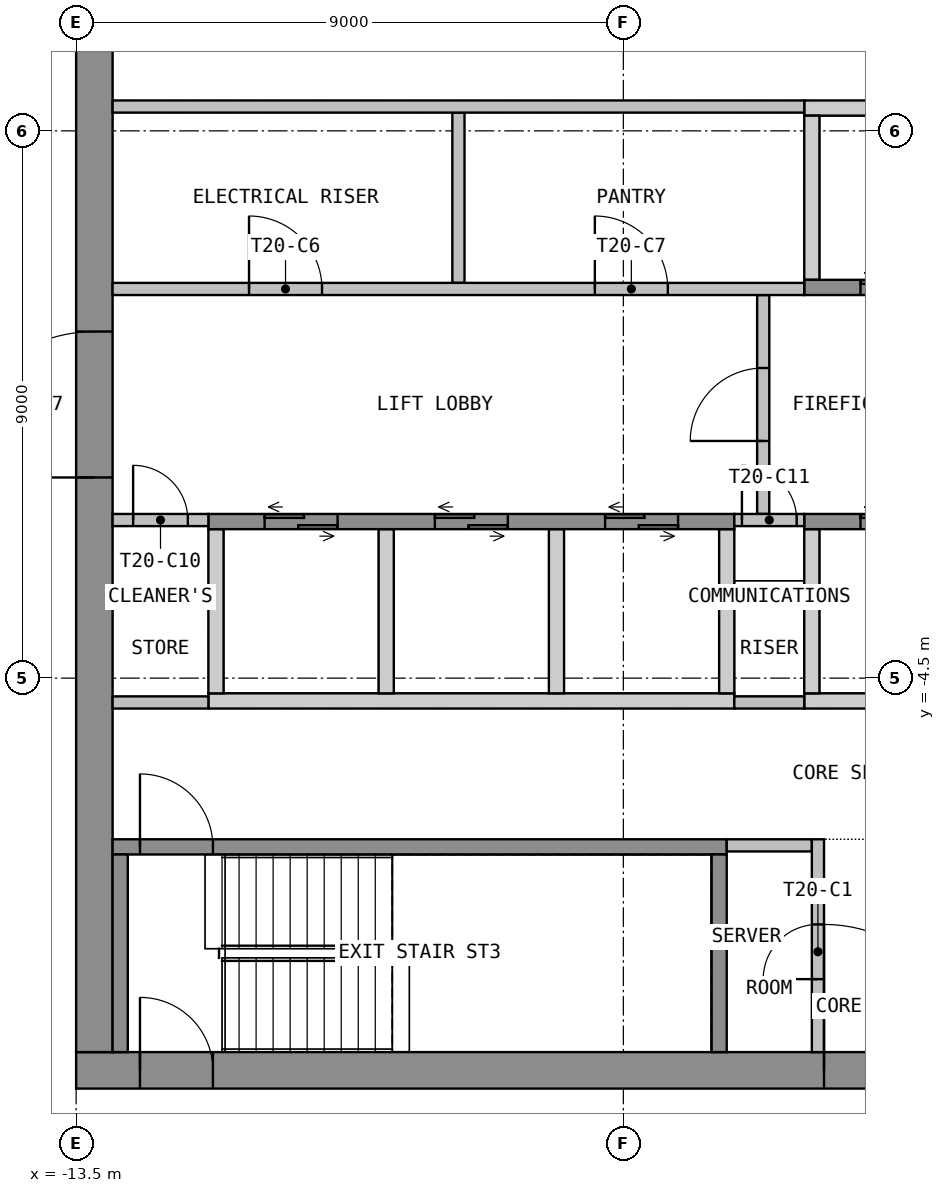
"""IFC4 building model, lengths in metres.
Left out: names, types, materials, properties, quantities, classifications, styles, units other than length and angle.
Written with IfcOpenShell. Run it as: python <this file> out.ifc"""

import sys

from ifc_helpers import new_model, si_unit, direction, frame, frame_2d, origin, place, context, subcontext, project, spatial, polyline, rectangle, outline, extrude, element, fill, save


model = new_model("IFC4")
c1 = context("Model", 3, precision=1e-05, world=origin(), true_north=direction((0.0, 1.0)))
c2 = subcontext(c1, "Body", "Model", "MODEL_VIEW")
j1 = project(units=[si_unit("LENGTHUNIT", "METRE"), si_unit("PLANEANGLEUNIT", "RADIAN")], contexts=[c1])
p1 = place(None, origin())
s1 = spatial("IfcSite", under=j1, at=p1, CompositionType="ELEMENT")
p2 = place(p1, origin())
s2 = spatial("IfcBuilding", under=s1, at=p2, CompositionType="ELEMENT")
p3 = place(p2, frame((0.0, 0.0, 270.3)))
s3 = spatial("IfcBuildingStorey", under=s2, at=p3, CompositionType="ELEMENT", Elevation=270.3)
p4 = place(p3, frame((-13.5, -10.95, 0.0), z_axis=(0.0, 0.0, 1.0), x_axis=(1.0, 0.0, 0.0)))
e1 = element("IfcWall", 1, at=p4, inside=s3, PredefinedType="SHEAR", context=c2, shape_type="SweptSolid", body=[
    extrude(rectangle(XDim=27.0, YDim=0.6, at=frame_2d((13.5, 0.0))), origin(), (0.0, 0.0, 1.0), 3.575),
])
p5 = place(p4, frame((12.3, 0.0, 0.0)))
e2 = element("IfcOpeningElement", 2, at=p5, cuts=e1, PredefinedType="OPENING", context=c2, shape_type="SweptSolid", body=[
    extrude(rectangle(XDim=2.4, YDim=2.1, at=frame_2d((1.2, 1.05))), frame((0.0, 0.31, 0.0), z_axis=(0.0, -1.0, 0.0), x_axis=(1.0, 0.0, 0.0)), (0.0, 0.0, 1.0), 0.62),
])
p6 = place(p4, frame((1.05, 0.0, 0.0)))
e3 = element("IfcOpeningElement", 3, at=p6, cuts=e1, PredefinedType="OPENING", context=c2, shape_type="SweptSolid", body=[
    extrude(rectangle(XDim=1.2, YDim=2.1, at=frame_2d((0.6, 1.05))), frame((0.0, 0.31, 0.0), z_axis=(0.0, -1.0, 0.0), x_axis=(1.0, 0.0, 0.0)), (0.0, 0.0, 1.0), 0.62),
])
p7 = place(p4, frame((24.75, 0.0, 0.0)))
e4 = element("IfcOpeningElement", 4, at=p7, cuts=e1, PredefinedType="OPENING", context=c2, shape_type="SweptSolid", body=[
    extrude(rectangle(XDim=1.2, YDim=2.1, at=frame_2d((0.6, 1.05))), frame((0.0, 0.31, 0.0), z_axis=(0.0, -1.0, 0.0), x_axis=(1.0, 0.0, 0.0)), (0.0, 0.0, 1.0), 0.62),
])
p8 = place(p3, frame((-13.2, -10.65, 0.0), z_axis=(0.0, 0.0, 1.0), x_axis=(0.0, 1.0, 0.0)))
e5 = element("IfcWall", 5, at=p8, inside=s3, PredefinedType="SHEAR", context=c2, shape_type="SweptSolid", body=[
    extrude(rectangle(XDim=21.3, YDim=0.6, at=frame_2d((10.65, 0.0))), origin(), (0.0, 0.0, 1.0), 3.575),
])
p9 = place(p8, frame((9.45, 0.0, 0.0)))
e6 = element("IfcOpeningElement", 6, at=p9, cuts=e5, PredefinedType="OPENING", context=c2, shape_type="SweptSolid", body=[
    extrude(rectangle(XDim=2.4, YDim=2.1, at=frame_2d((1.2, 1.05))), frame((0.0, 0.31, 0.0), z_axis=(0.0, -1.0, 0.0), x_axis=(1.0, 0.0, 0.0)), (0.0, 0.0, 1.0), 0.62),
])
p10 = place(p3, origin())
e7 = element("IfcWall", 7, at=p10, inside=s3, PredefinedType="SHEAR", context=c2, shape_type="SweptSolid", body=[
    extrude(outline(polyline([(-1.525, 4.75), (1.525, 4.75), (1.525, 5.0), (-1.525, 5.0), (-1.525, 4.75)])), origin(), (0.0, 0.0, 1.0), 3.575),
])
p11 = place(p3, origin())
e8 = element("IfcWall", 8, at=p11, inside=s3, PredefinedType="SHEAR", context=c2, shape_type="SweptSolid", body=[
    extrude(outline(polyline([(-1.525, 2.05), (-1.275, 2.05), (-1.275, 4.75), (-1.525, 4.75), (-1.525, 2.05)])), origin(), (0.0, 0.0, 1.0), 3.575),
])
p12 = place(p3, frame((-1.525, 1.925, 0.0), z_axis=(0.0, 0.0, 1.0), x_axis=(1.0, 0.0, 0.0)))
e9 = element("IfcWall", 9, at=p12, inside=s3, PredefinedType="SHEAR", context=c2, shape_type="SweptSolid", body=[
    extrude(rectangle(XDim=3.05, YDim=0.25, at=frame_2d((1.525, 0.0))), origin(), (0.0, 0.0, 1.0), 3.575),
])
p13 = place(p12, frame((0.925, 0.0, 0.0)))
e10 = element("IfcOpeningElement", 10, at=p13, cuts=e9, PredefinedType="OPENING", context=c2, shape_type="SweptSolid", body=[
    extrude(rectangle(XDim=1.2, YDim=2.1, at=frame_2d((0.6, 1.05))), frame((0.0, 0.135, 0.0), z_axis=(0.0, -1.0, 0.0), x_axis=(1.0, 0.0, 0.0)), (0.0, 0.0, 1.0), 0.27),
])
p14 = place(p3, origin())
e11 = element("IfcWall", 11, at=p14, inside=s3, PredefinedType="SHEAR", context=c2, shape_type="SweptSolid", body=[
    extrude(outline(polyline([(-11.325, -5.0), (-2.675, -5.0), (-2.675, -4.75), (-11.325, -4.75), (-11.325, -5.0)])), origin(), (0.0, 0.0, 1.0), 3.575),
])
p15 = place(p3, origin())
e12 = element("IfcWall", 12, at=p15, inside=s3, PredefinedType="SHEAR", context=c2, shape_type="SweptSolid", body=[
    extrude(outline(polyline([(-1.525, -5.0), (4.325, -5.0), (4.325, -4.75), (-1.525, -4.75), (-1.525, -5.0)])), origin(), (0.0, 0.0, 1.0), 3.575),
])
p16 = place(p3, origin())
e13 = element("IfcWall", 13, at=p16, inside=s3, PredefinedType="SHEAR", context=c2, shape_type="SweptSolid", body=[
    extrude(outline(polyline([(-11.325, -4.75), (-11.075, -4.75), (-11.075, -2.05), (-11.325, -2.05), (-11.325, -4.75)])), origin(), (0.0, 0.0, 1.0), 3.575),
])
p17 = place(p3, origin())
e14 = element("IfcWall", 14, at=p17, inside=s3, PredefinedType="SHEAR", context=c2, shape_type="SweptSolid", body=[
    extrude(outline(polyline([(-8.525, -4.75), (-8.275, -4.75), (-8.275, -2.05), (-8.525, -2.05), (-8.525, -4.75)])), origin(), (0.0, 0.0, 1.0), 3.575),
])
p18 = place(p3, origin())
e15 = element("IfcWall", 15, at=p18, inside=s3, PredefinedType="SHEAR", context=c2, shape_type="SweptSolid", body=[
    extrude(outline(polyline([(-5.725, -4.75), (-5.475, -4.75), (-5.475, -2.05), (-5.725, -2.05), (-5.725, -4.75)])), origin(), (0.0, 0.0, 1.0), 3.575),
])
p19 = place(p3, origin())
e16 = element("IfcWall", 16, at=p19, inside=s3, PredefinedType="SHEAR", context=c2, shape_type="SweptSolid", body=[
    extrude(outline(polyline([(-2.925, -4.75), (-2.675, -4.75), (-2.675, -2.05), (-2.925, -2.05), (-2.925, -4.75)])), origin(), (0.0, 0.0, 1.0), 3.575),
])
p20 = place(p3, origin())
e17 = element("IfcWall", 17, at=p20, inside=s3, PredefinedType="SHEAR", context=c2, shape_type="SweptSolid", body=[
    extrude(outline(polyline([(-1.525, -4.75), (-1.275, -4.75), (-1.275, -2.05), (-1.525, -2.05), (-1.525, -4.75)])), origin(), (0.0, 0.0, 1.0), 3.575),
])
p21 = place(p3, frame((-11.325, -1.925, 0.0), z_axis=(0.0, 0.0, 1.0), x_axis=(1.0, 0.0, 0.0)))
e18 = element("IfcWall", 18, at=p21, inside=s3, PredefinedType="SHEAR", context=c2, shape_type="SweptSolid", body=[
    extrude(rectangle(XDim=8.65, YDim=0.25, at=frame_2d((4.325, 0.0))), origin(), (0.0, 0.0, 1.0), 3.575),
])
p22 = place(p21, frame((0.925, 0.0, 0.0)))
e19 = element("IfcOpeningElement", 19, at=p22, cuts=e18, PredefinedType="OPENING", context=c2, shape_type="SweptSolid", body=[
    extrude(rectangle(XDim=1.2, YDim=2.1, at=frame_2d((0.6, 1.05))), frame((0.0, 0.135, 0.0), z_axis=(0.0, -1.0, 0.0), x_axis=(1.0, 0.0, 0.0)), (0.0, 0.0, 1.0), 0.27),
])
p23 = place(p21, frame((3.725, 0.0, 0.0)))
e20 = element("IfcOpeningElement", 20, at=p23, cuts=e18, PredefinedType="OPENING", context=c2, shape_type="SweptSolid", body=[
    extrude(rectangle(XDim=1.2, YDim=2.1, at=frame_2d((0.6, 1.05))), frame((0.0, 0.135, 0.0), z_axis=(0.0, -1.0, 0.0), x_axis=(1.0, 0.0, 0.0)), (0.0, 0.0, 1.0), 0.27),
])
p24 = place(p21, frame((6.525, 0.0, 0.0)))
e21 = element("IfcOpeningElement", 21, at=p24, cuts=e18, PredefinedType="OPENING", context=c2, shape_type="SweptSolid", body=[
    extrude(rectangle(XDim=1.2, YDim=2.1, at=frame_2d((0.6, 1.05))), frame((0.0, 0.135, 0.0), z_axis=(0.0, -1.0, 0.0), x_axis=(1.0, 0.0, 0.0)), (0.0, 0.0, 1.0), 0.27),
])
p25 = place(p3, frame((-1.525, -1.925, 0.0), z_axis=(0.0, 0.0, 1.0), x_axis=(1.0, 0.0, 0.0)))
e22 = element("IfcWall", 22, at=p25, inside=s3, PredefinedType="SHEAR", context=c2, shape_type="SweptSolid", body=[
    extrude(rectangle(XDim=5.85, YDim=0.25, at=frame_2d((2.925, 0.0))), origin(), (0.0, 0.0, 1.0), 3.575),
])
p26 = place(p25, frame((0.925, 0.0, 0.0)))
e23 = element("IfcOpeningElement", 23, at=p26, cuts=e22, PredefinedType="OPENING", context=c2, shape_type="SweptSolid", body=[
    extrude(rectangle(XDim=1.2, YDim=2.1, at=frame_2d((0.6, 1.05))), frame((0.0, 0.135, 0.0), z_axis=(0.0, -1.0, 0.0), x_axis=(1.0, 0.0, 0.0)), (0.0, 0.0, 1.0), 0.27),
])
p27 = place(p25, frame((3.725, 0.0, 0.0)))
e24 = element("IfcOpeningElement", 24, at=p27, cuts=e22, PredefinedType="OPENING", context=c2, shape_type="SweptSolid", body=[
    extrude(rectangle(XDim=1.2, YDim=2.1, at=frame_2d((0.6, 1.05))), frame((0.0, 0.135, 0.0), z_axis=(0.0, -1.0, 0.0), x_axis=(1.0, 0.0, 0.0)), (0.0, 0.0, 1.0), 0.27),
])
p28 = place(p3, frame((-2.2, -1.8, 0.0), z_axis=(0.0, 0.0, 1.0), x_axis=(0.0, 1.0, 0.0)))
e25 = element("IfcWall", 25, at=p28, inside=s3, PredefinedType="PARTITIONING", context=c2, shape_type="SweptSolid", body=[
    extrude(rectangle(XDim=3.6, YDim=0.2, at=frame_2d((1.8, 0.0))), origin(), (0.0, 0.0, 1.0), 3.575),
])
p29 = place(p28, frame((1.2, 0.0, 0.0)))
e26 = element("IfcOpeningElement", 26, at=p29, cuts=e25, PredefinedType="OPENING", context=c2, shape_type="SweptSolid", body=[
    extrude(rectangle(XDim=1.2, YDim=2.1, at=frame_2d((0.6, 1.05))), frame((0.0, 0.11, 0.0), z_axis=(0.0, -1.0, 0.0), x_axis=(1.0, 0.0, 0.0)), (0.0, 0.0, 1.0), 0.22),
])
p30 = place(p3, frame((-12.9, -7.275, 0.0), z_axis=(0.0, 0.0, 1.0), x_axis=(1.0, 0.0, 0.0)))
e27 = element("IfcWall", 27, at=p30, inside=s3, PredefinedType="SHEAR", context=c2, shape_type="SweptSolid", body=[
    extrude(rectangle(XDim=10.1, YDim=0.25, at=frame_2d((5.05, 0.0))), origin(), (0.0, 0.0, 1.0), 3.575),
])
p31 = place(p30, frame((0.45, 0.0, 0.0)))
e28 = element("IfcOpeningElement", 28, at=p31, cuts=e27, PredefinedType="OPENING", context=c2, shape_type="SweptSolid", body=[
    extrude(rectangle(XDim=1.2, YDim=2.1, at=frame_2d((0.6, 1.05))), frame((0.0, 0.135, 0.0), z_axis=(0.0, -1.0, 0.0), x_axis=(1.0, 0.0, 0.0)), (0.0, 0.0, 1.0), 0.27),
])
for number, where, z_axis, x_axis in (
    (29, (-12.775, -10.65, 0.0), (0.0, 0.0, 1.0), (0.0, 1.0, 0.0)),
    (30, (-2.925, -10.65, 0.0), (0.0, 0.0, 1.0), (0.0, 1.0, 0.0)),
):
    element("IfcWall", number, at=place(p3, frame(where, z_axis=z_axis, x_axis=x_axis)), inside=s3, PredefinedType="SHEAR", context=c2, shape_type="SweptSolid", body=[
        extrude(rectangle(XDim=3.25, YDim=0.25, at=frame_2d((1.625, 0.0))), origin(), (0.0, 0.0, 1.0), 3.575),
    ])
p32 = place(p3, frame((-2.8, -7.25, 0.0), z_axis=(0.0, 0.0, 1.0), x_axis=(1.0, 0.0, 0.0)))
e31 = element("IfcWall", 31, at=p32, inside=s3, PredefinedType="PARTITIONING", context=c2, shape_type="SweptSolid", body=[
    extrude(rectangle(XDim=1.4, YDim=0.2, at=frame_2d((0.7, 0.0))), origin(), (0.0, 0.0, 1.0), 3.575),
])
p33 = place(p3, frame((-1.3, -10.65, 0.0), z_axis=(0.0, 0.0, 1.0), x_axis=(0.0, 1.0, 0.0)))
e32 = element("IfcWall", 32, at=p33, inside=s3, PredefinedType="PARTITIONING", context=c2, shape_type="SweptSolid", body=[
    extrude(rectangle(XDim=3.5, YDim=0.2, at=frame_2d((1.75, 0.0))), origin(), (0.0, 0.0, 1.0), 3.575),
])
p34 = place(p33, frame((1.2, 0.0, 0.0)))
e33 = element("IfcOpeningElement", 33, at=p34, cuts=e32, PredefinedType="OPENING", context=c2, shape_type="SweptSolid", body=[
    extrude(rectangle(XDim=0.9, YDim=2.1, at=frame_2d((0.45, 1.05))), frame((0.0, 0.11, 0.0), z_axis=(0.0, -1.0, 0.0), x_axis=(1.0, 0.0, 0.0)), (0.0, 0.0, 1.0), 0.22),
])
p35 = place(p3, frame((-7.212, 2.0, 0.0), z_axis=(0.0, 0.0, 1.0), x_axis=(0.0, 1.0, 0.0)))
e34 = element("IfcWall", 34, at=p35, inside=s3, PredefinedType="PARTITIONING", context=c2, shape_type="SweptSolid", body=[
    extrude(rectangle(XDim=2.8, YDim=0.2, at=frame_2d((1.4, 0.0))), origin(), (0.0, 0.0, 1.0), 3.575),
])
p36 = place(p3, frame((-12.9, 1.9, 0.0), z_axis=(0.0, 0.0, 1.0), x_axis=(1.0, 0.0, 0.0)))
e35 = element("IfcWall", 35, at=p36, inside=s3, PredefinedType="PARTITIONING", context=c2, shape_type="SweptSolid", body=[
    extrude(rectangle(XDim=11.375, YDim=0.2, at=frame_2d((5.688, 0.0))), origin(), (0.0, 0.0, 1.0), 3.575),
])
p37 = place(p36, frame((2.244, 0.0, 0.0)))
e36 = element("IfcOpeningElement", 36, at=p37, cuts=e35, PredefinedType="OPENING", context=c2, shape_type="SweptSolid", body=[
    extrude(rectangle(XDim=1.2, YDim=2.1, at=frame_2d((0.6, 1.05))), frame((0.0, 0.11, 0.0), z_axis=(0.0, -1.0, 0.0), x_axis=(1.0, 0.0, 0.0)), (0.0, 0.0, 1.0), 0.22),
])
p38 = place(p36, frame((7.931, 0.0, 0.0)))
e37 = element("IfcOpeningElement", 37, at=p38, cuts=e35, PredefinedType="OPENING", context=c2, shape_type="SweptSolid", body=[
    extrude(rectangle(XDim=1.2, YDim=2.1, at=frame_2d((0.6, 1.05))), frame((0.0, 0.11, 0.0), z_axis=(0.0, -1.0, 0.0), x_axis=(1.0, 0.0, 0.0)), (0.0, 0.0, 1.0), 0.22),
])
p39 = place(p3, frame((-12.9, 4.9, 0.0), z_axis=(0.0, 0.0, 1.0), x_axis=(1.0, 0.0, 0.0)))
e38 = element("IfcWall", 38, at=p39, inside=s3, PredefinedType="PARTITIONING", context=c2, shape_type="SweptSolid", body=[
    extrude(rectangle(XDim=11.375, YDim=0.2, at=frame_2d((5.688, 0.0))), origin(), (0.0, 0.0, 1.0), 3.575),
])
p40 = place(p3, frame((-12.9, -1.9, 0.0), z_axis=(0.0, 0.0, 1.0), x_axis=(1.0, 0.0, 0.0)))
e39 = element("IfcWall", 39, at=p40, inside=s3, PredefinedType="PARTITIONING", context=c2, shape_type="SweptSolid", body=[
    extrude(rectangle(XDim=1.575, YDim=0.2, at=frame_2d((0.788, 0.0))), origin(), (0.0, 0.0, 1.0), 3.575),
])
p41 = place(p40, frame((0.337, 0.0, 0.0)))
e40 = element("IfcOpeningElement", 40, at=p41, cuts=e39, PredefinedType="OPENING", context=c2, shape_type="SweptSolid", body=[
    extrude(rectangle(XDim=0.9, YDim=2.1, at=frame_2d((0.45, 1.05))), frame((0.0, 0.11, 0.0), z_axis=(0.0, -1.0, 0.0), x_axis=(1.0, 0.0, 0.0)), (0.0, 0.0, 1.0), 0.22),
])
p42 = place(p3, frame((-12.9, -4.9, 0.0), z_axis=(0.0, 0.0, 1.0), x_axis=(1.0, 0.0, 0.0)))
e41 = element("IfcWall", 41, at=p42, inside=s3, PredefinedType="PARTITIONING", context=c2, shape_type="SweptSolid", body=[
    extrude(rectangle(XDim=1.575, YDim=0.2, at=frame_2d((0.788, 0.0))), origin(), (0.0, 0.0, 1.0), 3.575),
])
p43 = place(p3, frame((-2.675, -1.9, 0.0), z_axis=(0.0, 0.0, 1.0), x_axis=(1.0, 0.0, 0.0)))
e42 = element("IfcWall", 42, at=p43, inside=s3, PredefinedType="PARTITIONING", context=c2, shape_type="SweptSolid", body=[
    extrude(rectangle(XDim=1.15, YDim=0.2, at=frame_2d((0.575, 0.0))), origin(), (0.0, 0.0, 1.0), 3.575),
])
p44 = place(p43, frame((0.125, 0.0, 0.0)))
e43 = element("IfcOpeningElement", 43, at=p44, cuts=e42, PredefinedType="OPENING", context=c2, shape_type="SweptSolid", body=[
    extrude(rectangle(XDim=0.9, YDim=2.1, at=frame_2d((0.45, 1.05))), frame((0.0, 0.11, 0.0), z_axis=(0.0, -1.0, 0.0), x_axis=(1.0, 0.0, 0.0)), (0.0, 0.0, 1.0), 0.22),
])
p45 = place(p3, frame((-2.675, -4.9, 0.0), z_axis=(0.0, 0.0, 1.0), x_axis=(1.0, 0.0, 0.0)))
e44 = element("IfcWall", 44, at=p45, inside=s3, PredefinedType="PARTITIONING", context=c2, shape_type="SweptSolid", body=[
    extrude(rectangle(XDim=1.15, YDim=0.2, at=frame_2d((0.575, 0.0))), origin(), (0.0, 0.0, 1.0), 3.575),
])
p46 = place(p9, origin())
e45 = element("IfcDoor", 45, at=p46, inside=s3, OperationType="DOUBLE_DOOR_DOUBLE_SWING", PredefinedType="DOOR", context=c2, shape_type="SweptSolid", body=[
    extrude(rectangle(XDim=2.4, YDim=2.1, at=frame_2d((1.2, 1.05))), frame((0.0, 0.025, 0.0), z_axis=(0.0, -1.0, 0.0), x_axis=(1.0, 0.0, 0.0)), (0.0, 0.0, 1.0), 0.05),
])
fill(e6, e45)
p47 = place(p5, origin())
e46 = element("IfcDoor", 46, at=p47, inside=s3, OperationType="DOUBLE_DOOR_DOUBLE_SWING", PredefinedType="DOOR", context=c2, shape_type="SweptSolid", body=[
    extrude(rectangle(XDim=2.4, YDim=2.1, at=frame_2d((1.2, 1.05))), frame((0.0, 0.025, 0.0), z_axis=(0.0, -1.0, 0.0), x_axis=(1.0, 0.0, 0.0)), (0.0, 0.0, 1.0), 0.05),
])
fill(e2, e46)
p48 = place(p6, origin())
e47 = element("IfcDoor", 47, at=p48, inside=s3, OperationType="SINGLE_SWING_RIGHT", PredefinedType="DOOR", context=c2, shape_type="SweptSolid", body=[
    extrude(rectangle(XDim=1.2, YDim=2.1, at=frame_2d((0.6, 1.05))), frame((0.0, 0.025, 0.0), z_axis=(0.0, -1.0, 0.0), x_axis=(1.0, 0.0, 0.0)), (0.0, 0.0, 1.0), 0.05),
])
fill(e3, e47)
p49 = place(p13, origin())
e48 = element("IfcDoor", 48, at=p49, inside=s3, OperationType="DOUBLE_DOOR_SLIDING", PredefinedType="DOOR", context=c2, shape_type="SweptSolid", body=[
    extrude(rectangle(XDim=1.2, YDim=2.1, at=frame_2d((0.6, 1.05))), frame((0.0, 0.025, 0.0), z_axis=(0.0, -1.0, 0.0), x_axis=(1.0, 0.0, 0.0)), (0.0, 0.0, 1.0), 0.05),
])
fill(e10, e48)
p50 = place(p22, origin())
e49 = element("IfcDoor", 49, at=p50, inside=s3, OperationType="DOUBLE_DOOR_SLIDING", PredefinedType="DOOR", context=c2, shape_type="SweptSolid", body=[
    extrude(rectangle(XDim=1.2, YDim=2.1, at=frame_2d((0.6, 1.05))), frame((0.0, 0.025, 0.0), z_axis=(0.0, -1.0, 0.0), x_axis=(1.0, 0.0, 0.0)), (0.0, 0.0, 1.0), 0.05),
])
fill(e19, e49)
p51 = place(p23, origin())
e50 = element("IfcDoor", 50, at=p51, inside=s3, OperationType="DOUBLE_DOOR_SLIDING", PredefinedType="DOOR", context=c2, shape_type="SweptSolid", body=[
    extrude(rectangle(XDim=1.2, YDim=2.1, at=frame_2d((0.6, 1.05))), frame((0.0, 0.025, 0.0), z_axis=(0.0, -1.0, 0.0), x_axis=(1.0, 0.0, 0.0)), (0.0, 0.0, 1.0), 0.05),
])
fill(e20, e50)
p52 = place(p24, origin())
e51 = element("IfcDoor", 51, at=p52, inside=s3, OperationType="DOUBLE_DOOR_SLIDING", PredefinedType="DOOR", context=c2, shape_type="SweptSolid", body=[
    extrude(rectangle(XDim=1.2, YDim=2.1, at=frame_2d((0.6, 1.05))), frame((0.0, 0.025, 0.0), z_axis=(0.0, -1.0, 0.0), x_axis=(1.0, 0.0, 0.0)), (0.0, 0.0, 1.0), 0.05),
])
fill(e21, e51)
p53 = place(p26, origin())
e52 = element("IfcDoor", 52, at=p53, inside=s3, OperationType="DOUBLE_DOOR_SLIDING", PredefinedType="DOOR", context=c2, shape_type="SweptSolid", body=[
    extrude(rectangle(XDim=1.2, YDim=2.1, at=frame_2d((0.6, 1.05))), frame((0.0, 0.025, 0.0), z_axis=(0.0, -1.0, 0.0), x_axis=(1.0, 0.0, 0.0)), (0.0, 0.0, 1.0), 0.05),
])
fill(e23, e52)
p54 = place(p29, origin())
e53 = element("IfcDoor", 53, at=p54, inside=s3, OperationType="SINGLE_SWING_LEFT", PredefinedType="DOOR", context=c2, shape_type="SweptSolid", body=[
    extrude(rectangle(XDim=1.2, YDim=2.1, at=frame_2d((0.6, 1.05))), frame((0.0, 0.025, 0.0), z_axis=(0.0, -1.0, 0.0), x_axis=(1.0, 0.0, 0.0)), (0.0, 0.0, 1.0), 0.05),
])
fill(e26, e53)
p55 = place(p31, origin())
e54 = element("IfcDoor", 54, at=p55, inside=s3, OperationType="SINGLE_SWING_LEFT", PredefinedType="DOOR", context=c2, shape_type="SweptSolid", body=[
    extrude(rectangle(XDim=1.2, YDim=2.1, at=frame_2d((0.6, 1.05))), frame((0.0, 0.025, 0.0), z_axis=(0.0, -1.0, 0.0), x_axis=(1.0, 0.0, 0.0)), (0.0, 0.0, 1.0), 0.05),
])
fill(e28, e54)
p56 = place(p34, origin())
e55 = element("IfcDoor", 55, at=p56, inside=s3, OperationType="SINGLE_SWING_LEFT", PredefinedType="DOOR", context=c2, shape_type="SweptSolid", body=[
    extrude(rectangle(XDim=0.9, YDim=2.1, at=frame_2d((0.45, 1.05))), frame((0.0, 0.025, 0.0), z_axis=(0.0, -1.0, 0.0), x_axis=(1.0, 0.0, 0.0)), (0.0, 0.0, 1.0), 0.05),
])
fill(e33, e55)
p57 = place(p37, origin())
e56 = element("IfcDoor", 56, at=p57, inside=s3, OperationType="SINGLE_SWING_RIGHT", PredefinedType="DOOR", context=c2, shape_type="SweptSolid", body=[
    extrude(rectangle(XDim=1.2, YDim=2.1, at=frame_2d((0.6, 1.05))), frame((0.0, 0.025, 0.0), z_axis=(0.0, -1.0, 0.0), x_axis=(1.0, 0.0, 0.0)), (0.0, 0.0, 1.0), 0.05),
])
fill(e36, e56)
p58 = place(p38, origin())
e57 = element("IfcDoor", 57, at=p58, inside=s3, OperationType="SINGLE_SWING_RIGHT", PredefinedType="DOOR", context=c2, shape_type="SweptSolid", body=[
    extrude(rectangle(XDim=1.2, YDim=2.1, at=frame_2d((0.6, 1.05))), frame((0.0, 0.025, 0.0), z_axis=(0.0, -1.0, 0.0), x_axis=(1.0, 0.0, 0.0)), (0.0, 0.0, 1.0), 0.05),
])
fill(e37, e57)
p59 = place(p41, origin())
e58 = element("IfcDoor", 58, at=p59, inside=s3, OperationType="SINGLE_SWING_LEFT", PredefinedType="DOOR", context=c2, shape_type="SweptSolid", body=[
    extrude(rectangle(XDim=0.9, YDim=2.1, at=frame_2d((0.45, 1.05))), frame((0.0, 0.025, 0.0), z_axis=(0.0, -1.0, 0.0), x_axis=(1.0, 0.0, 0.0)), (0.0, 0.0, 1.0), 0.05),
])
fill(e40, e58)
p60 = place(p44, origin())
e59 = element("IfcDoor", 59, at=p60, inside=s3, OperationType="SINGLE_SWING_LEFT", PredefinedType="DOOR", context=c2, shape_type="SweptSolid", body=[
    extrude(rectangle(XDim=0.9, YDim=2.1, at=frame_2d((0.45, 1.05))), frame((0.0, 0.025, 0.0), z_axis=(0.0, -1.0, 0.0), x_axis=(1.0, 0.0, 0.0)), (0.0, 0.0, 1.0), 0.05),
])
fill(e43, e59)
save(model, sys.argv[1])
